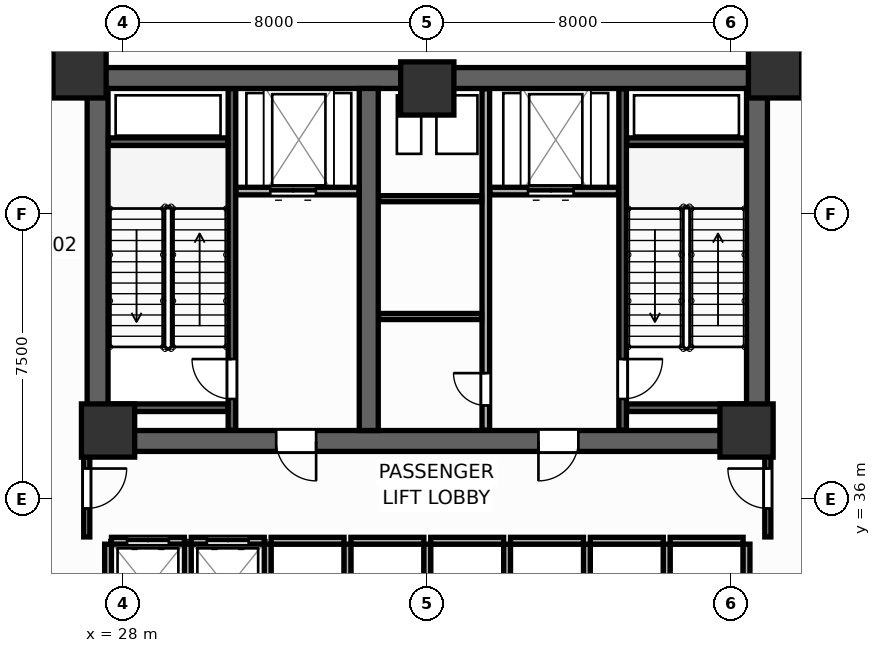
"""IFC4 building model, lengths in metres.
Left out: names, types, materials, properties, quantities, classifications, styles, units other than length and angle.
Written with IfcOpenShell. Run it as: python <this file> out.ifc"""

import sys

from ifc_helpers import new_model, si_unit, direction, frame, frame_2d, origin, origin_2d, place, context, subcontext, project, spatial, rectangle, extrude, source, transform, mapped, element, fill, save


model = new_model("IFC4")
c1 = context("Model", 3, precision=1e-05, world=origin(), true_north=direction((0.0, 1.0)))
c2 = subcontext(c1, "Body", "Model", "MODEL_VIEW")
j1 = project(units=[si_unit("LENGTHUNIT", "METRE"), si_unit("PLANEANGLEUNIT", "RADIAN")], contexts=[c1])
p1 = place(None, origin())
s1 = spatial("IfcSite", under=j1, at=p1, CompositionType="ELEMENT")
p2 = place(p1, origin())
s2 = spatial("IfcBuilding", under=s1, at=p2, CompositionType="ELEMENT")
p3 = place(p2, frame((0.0, 0.0, 59.1)))
s3 = spatial("IfcBuildingStorey", under=s2, at=p3, CompositionType="ELEMENT", Elevation=59.1)
p4 = place(p3, frame((27.05, 47.075, 0.0), z_axis=(0.0, 0.0, 1.0), x_axis=(1.0, 0.0, 0.0)))
e1 = element("IfcWall", 1, at=p4, inside=s3, PredefinedType="SHEAR", context=c2, shape_type="SweptSolid", body=[
    extrude(rectangle(XDim=17.9, YDim=0.55, at=frame_2d((8.95, 0.0))), origin(), (0.0, 0.0, 1.0), 4.8),
])
p5 = place(p3, frame((27.05, 37.525, 0.0), z_axis=(0.0, 0.0, 1.0), x_axis=(1.0, 0.0, 0.0)))
e2 = element("IfcWall", 2, at=p5, inside=s3, PredefinedType="SHEAR", context=c2, shape_type="SweptSolid", body=[
    extrude(rectangle(XDim=17.9, YDim=0.55, at=frame_2d((8.95, 0.0))), origin(), (0.0, 0.0, 1.0), 4.8),
])
p6 = place(p5, frame((4.975, 0.0, 0.0)))
e3 = element("IfcOpeningElement", 3, at=p6, cuts=e2, PredefinedType="OPENING", context=c2, shape_type="SweptSolid", body=[
    extrude(rectangle(XDim=1.05, YDim=2.1, at=frame_2d((0.525, 1.05))), frame((0.0, 0.285, 0.0), z_axis=(0.0, -1.0, 0.0), x_axis=(1.0, 0.0, 0.0)), (0.0, 0.0, 1.0), 0.57),
])
p7 = place(p5, frame((11.875, 0.0, 0.0)))
e4 = element("IfcOpeningElement", 4, at=p7, cuts=e2, PredefinedType="OPENING", context=c2, shape_type="SweptSolid", body=[
    extrude(rectangle(XDim=1.05, YDim=2.1, at=frame_2d((0.525, 1.05))), frame((0.0, 0.285, 0.0), z_axis=(0.0, -1.0, 0.0), x_axis=(1.0, 0.0, 0.0)), (0.0, 0.0, 1.0), 0.57),
])
for number, where, z_axis, x_axis in (
    (5, (27.325, 37.8, 0.0), (0.0, 0.0, 1.0), (0.0, 1.0, 0.0)),
    (6, (44.675, 37.8, 0.0), (0.0, 0.0, 1.0), (0.0, 1.0, 0.0)),
):
    element("IfcWall", number, at=place(p3, frame(where, z_axis=z_axis, x_axis=x_axis)), inside=s3, PredefinedType="SHEAR", context=c2, shape_type="SweptSolid", body=[
        extrude(rectangle(XDim=9.0, YDim=0.55, at=frame_2d((4.5, 0.0))), origin(), (0.0, 0.0, 1.0), 4.8),
    ])
p8 = place(p3, frame((34.46, 37.8, 0.0), z_axis=(0.0, 0.0, 1.0), x_axis=(0.0, 1.0, 0.0)))
e7 = element("IfcWall", 7, at=p8, inside=s3, PredefinedType="SHEAR", context=c2, shape_type="SweptSolid", body=[
    extrude(rectangle(XDim=9.0, YDim=0.5, at=frame_2d((4.5, 0.0))), origin(), (0.0, 0.0, 1.0), 4.58),
])
m1 = source(origin(), c2, "Body", "SweptSolid", [
    extrude(rectangle(XDim=1.4, YDim=1.4, at=origin_2d()), origin(), (0.0, 0.0, 1.0), 4.8),
])
for number, where, z_axis, x_axis in (
    (8, (26.85, 47.25, 0.0), (0.0, 0.0, 1.0), (1.0, 0.0, 0.0)),
    (9, (45.15, 47.25, 0.0), (0.0, 0.0, 1.0), (1.0, 0.0, 0.0)),
    (10, (27.6, 37.8, 0.0), (0.0, 0.0, 1.0), (1.0, 0.0, 0.0)),
    (11, (44.4, 37.8, 0.0), (0.0, 0.0, 1.0), (1.0, 0.0, 0.0)),
    (12, (36.0, 46.8, 0.0), (0.0, 0.0, 1.0), (1.0, 0.0, 0.0)),
):
    element("IfcColumn", number, at=place(p3, frame(where, z_axis=z_axis, x_axis=x_axis)), inside=s3, PredefinedType="COLUMN", context=c2, shape_type="MappedRepresentation", body=[
        mapped(m1, transform((0.0, 0.0, 0.0), scale=1.0)),
    ])
p9 = place(p3, frame((30.86, 37.81, 0.0), z_axis=(0.0, 0.0, 1.0), x_axis=(0.0, 1.0, 0.0)))
e13 = element("IfcWall", 13, at=p9, inside=s3, PredefinedType="SHEAR", context=c2, shape_type="SweptSolid", body=[
    extrude(rectangle(XDim=8.98, YDim=0.2, at=frame_2d((4.49, 0.0))), origin(), (0.0, 0.0, 1.0), 4.8),
])
p10 = place(p9, frame((0.82, 0.0, 0.0)))
e14 = element("IfcOpeningElement", 14, at=p10, cuts=e13, PredefinedType="OPENING", context=c2, shape_type="SweptSolid", body=[
    extrude(rectangle(XDim=1.05, YDim=2.1, at=frame_2d((0.525, 1.05))), frame((0.0, 0.11, 0.0), z_axis=(0.0, -1.0, 0.0), x_axis=(1.0, 0.0, 0.0)), (0.0, 0.0, 1.0), 0.22),
])
for number, where, z_axis, x_axis in (
    (15, (27.61, 45.4, 0.0), (0.0, 0.0, 1.0), (1.0, 0.0, 0.0)),
    (16, (27.61, 38.4, 0.0), (0.0, 0.0, 1.0), (1.0, 0.0, 0.0)),
):
    element("IfcWall", number, at=place(p3, frame(where, z_axis=z_axis, x_axis=x_axis)), inside=s3, PredefinedType="SHEAR", context=c2, shape_type="SweptSolid", body=[
        extrude(rectangle(XDim=3.14, YDim=0.2, at=frame_2d((1.57, 0.0))), origin(), (0.0, 0.0, 1.0), 4.8),
    ])
p11 = place(p3, frame((41.14, 37.81, 0.0), z_axis=(0.0, 0.0, 1.0), x_axis=(0.0, 1.0, 0.0)))
e17 = element("IfcWall", 17, at=p11, inside=s3, PredefinedType="SHEAR", context=c2, shape_type="SweptSolid", body=[
    extrude(rectangle(XDim=8.98, YDim=0.2, at=frame_2d((4.49, 0.0))), origin(), (0.0, 0.0, 1.0), 4.8),
])
p12 = place(p11, frame((0.82, 0.0, 0.0)))
e18 = element("IfcOpeningElement", 18, at=p12, cuts=e17, PredefinedType="OPENING", context=c2, shape_type="SweptSolid", body=[
    extrude(rectangle(XDim=1.05, YDim=2.1, at=frame_2d((0.525, 1.05))), frame((0.0, 0.11, 0.0), z_axis=(0.0, -1.0, 0.0), x_axis=(1.0, 0.0, 0.0)), (0.0, 0.0, 1.0), 0.22),
])
for number, where, z_axis, x_axis in (
    (19, (41.25, 45.4, 0.0), (0.0, 0.0, 1.0), (1.0, 0.0, 0.0)),
    (20, (41.25, 38.4, 0.0), (0.0, 0.0, 1.0), (1.0, 0.0, 0.0)),
):
    element("IfcWall", number, at=place(p3, frame(where, z_axis=z_axis, x_axis=x_axis)), inside=s3, PredefinedType="SHEAR", context=c2, shape_type="SweptSolid", body=[
        extrude(rectangle(XDim=3.14, YDim=0.2, at=frame_2d((1.57, 0.0))), origin(), (0.0, 0.0, 1.0), 4.8),
    ])
p13 = place(p3, frame((30.97, 44.1, 0.0), z_axis=(0.0, 0.0, 1.0), x_axis=(1.0, 0.0, 0.0)))
e21 = element("IfcWall", 21, at=p13, inside=s3, PredefinedType="PARTITIONING", context=c2, shape_type="SweptSolid", body=[
    extrude(rectangle(XDim=3.23, YDim=0.2, at=frame_2d((1.615, 0.0))), origin(), (0.0, 0.0, 1.0), 4.58),
])
p14 = place(p13, frame((0.9, 0.0, 0.0)))
e22 = element("IfcOpeningElement", 22, at=p14, cuts=e21, PredefinedType="OPENING", context=c2, shape_type="SweptSolid", body=[
    extrude(rectangle(XDim=1.2, YDim=2.1, at=frame_2d((0.6, 1.05))), frame((0.0, 0.11, 0.0), z_axis=(0.0, -1.0, 0.0), x_axis=(1.0, 0.0, 0.0)), (0.0, 0.0, 1.0), 0.22),
])
p15 = place(p3, frame((37.65, 44.1, 0.0), z_axis=(0.0, 0.0, 1.0), x_axis=(1.0, 0.0, 0.0)))
e23 = element("IfcWall", 23, at=p15, inside=s3, PredefinedType="PARTITIONING", context=c2, shape_type="SweptSolid", body=[
    extrude(rectangle(XDim=3.38, YDim=0.2, at=frame_2d((1.69, 0.0))), origin(), (0.0, 0.0, 1.0), 4.58),
])
p16 = place(p15, frame((1.0, 0.0, 0.0)))
e24 = element("IfcOpeningElement", 24, at=p16, cuts=e23, PredefinedType="OPENING", context=c2, shape_type="SweptSolid", body=[
    extrude(rectangle(XDim=1.2, YDim=2.1, at=frame_2d((0.6, 1.05))), frame((0.0, 0.11, 0.0), z_axis=(0.0, -1.0, 0.0), x_axis=(1.0, 0.0, 0.0)), (0.0, 0.0, 1.0), 0.22),
])
p17 = place(p3, frame((37.54, 37.81, 0.0), z_axis=(0.0, 0.0, 1.0), x_axis=(0.0, 1.0, 0.0)))
e25 = element("IfcWall", 25, at=p17, inside=s3, PredefinedType="PARTITIONING", context=c2, shape_type="SweptSolid", body=[
    extrude(rectangle(XDim=8.98, YDim=0.2, at=frame_2d((4.49, 0.0))), origin(), (0.0, 0.0, 1.0), 4.58),
])
p18 = place(p17, frame((0.65, 0.0, 0.0)))
e26 = element("IfcOpeningElement", 26, at=p18, cuts=e25, PredefinedType="OPENING", context=c2, shape_type="SweptSolid", body=[
    extrude(rectangle(XDim=0.85, YDim=2.05, at=frame_2d((0.425, 1.025))), frame((0.0, 0.11, 0.0), z_axis=(0.0, -1.0, 0.0), x_axis=(1.0, 0.0, 0.0)), (0.0, 0.0, 1.0), 0.22),
])
for number, where, z_axis, x_axis in (
    (27, (34.72, 40.8, 0.0), (0.0, 0.0, 1.0), (1.0, 0.0, 0.0)),
    (28, (34.72, 43.9, 0.0), (0.0, 0.0, 1.0), (1.0, 0.0, 0.0)),
):
    element("IfcWall", number, at=place(p3, frame(where, z_axis=z_axis, x_axis=x_axis)), inside=s3, PredefinedType="PARTITIONING", context=c2, shape_type="SweptSolid", body=[
        extrude(rectangle(XDim=2.71, YDim=0.16, at=frame_2d((1.355, 0.0))), origin(), (0.0, 0.0, 1.0), 4.58),
    ])
p19 = place(p3, frame((27.69, 34.9, 0.0), z_axis=(0.0, 0.0, 1.0), x_axis=(1.0, 0.0, 0.0)))
e29 = element("IfcWall", 29, at=p19, inside=s3, PredefinedType="PARTITIONING", context=c2, shape_type="SweptSolid", body=[
    extrude(rectangle(XDim=1.92, YDim=0.18, at=frame_2d((0.96, 0.0))), origin(), (0.0, 0.0, 1.0), 4.58),
])
p20 = place(p19, frame((0.41, 0.0, 0.0)))
e30 = element("IfcOpeningElement", 30, at=p20, cuts=e29, PredefinedType="OPENING", context=c2, shape_type="SweptSolid", body=[
    extrude(rectangle(XDim=1.1, YDim=2.1, at=frame_2d((0.55, 1.05))), frame((0.0, 0.1, 0.0), z_axis=(0.0, -1.0, 0.0), x_axis=(1.0, 0.0, 0.0)), (0.0, 0.0, 1.0), 0.2),
])
p21 = place(p3, frame((27.6, 32.49, 0.0), z_axis=(0.0, 0.0, 1.0), x_axis=(0.0, 1.0, 0.0)))
e31 = element("IfcWall", 31, at=p21, inside=s3, PredefinedType="PARTITIONING", context=c2, shape_type="SweptSolid", body=[
    extrude(rectangle(XDim=2.32, YDim=0.18, at=frame_2d((1.16, 0.0))), origin(), (0.0, 0.0, 1.0), 4.58),
])
p22 = place(p3, frame((29.79, 34.9, 0.0), z_axis=(0.0, 0.0, 1.0), x_axis=(1.0, 0.0, 0.0)))
e32 = element("IfcWall", 32, at=p22, inside=s3, PredefinedType="PARTITIONING", context=c2, shape_type="SweptSolid", body=[
    extrude(rectangle(XDim=1.92, YDim=0.18, at=frame_2d((0.96, 0.0))), origin(), (0.0, 0.0, 1.0), 4.58),
])
p23 = place(p22, frame((0.41, 0.0, 0.0)))
e33 = element("IfcOpeningElement", 33, at=p23, cuts=e32, PredefinedType="OPENING", context=c2, shape_type="SweptSolid", body=[
    extrude(rectangle(XDim=1.1, YDim=2.1, at=frame_2d((0.55, 1.05))), frame((0.0, 0.1, 0.0), z_axis=(0.0, -1.0, 0.0), x_axis=(1.0, 0.0, 0.0)), (0.0, 0.0, 1.0), 0.2),
])
p24 = place(p3, frame((29.7, 32.49, 0.0), z_axis=(0.0, 0.0, 1.0), x_axis=(0.0, 1.0, 0.0)))
e34 = element("IfcWall", 34, at=p24, inside=s3, PredefinedType="PARTITIONING", context=c2, shape_type="SweptSolid", body=[
    extrude(rectangle(XDim=2.32, YDim=0.18, at=frame_2d((1.16, 0.0))), origin(), (0.0, 0.0, 1.0), 4.58),
])
p25 = place(p3, frame((31.89, 34.9, 0.0), z_axis=(0.0, 0.0, 1.0), x_axis=(1.0, 0.0, 0.0)))
e35 = element("IfcWall", 35, at=p25, inside=s3, PredefinedType="PARTITIONING", context=c2, shape_type="SweptSolid", body=[
    extrude(rectangle(XDim=1.92, YDim=0.18, at=frame_2d((0.96, 0.0))), origin(), (0.0, 0.0, 1.0), 4.58),
])
p26 = place(p3, frame((31.8, 32.49, 0.0), z_axis=(0.0, 0.0, 1.0), x_axis=(0.0, 1.0, 0.0)))
e36 = element("IfcWall", 36, at=p26, inside=s3, PredefinedType="PARTITIONING", context=c2, shape_type="SweptSolid", body=[
    extrude(rectangle(XDim=2.32, YDim=0.18, at=frame_2d((1.16, 0.0))), origin(), (0.0, 0.0, 1.0), 4.58),
])
p27 = place(p3, frame((33.99, 34.9, 0.0), z_axis=(0.0, 0.0, 1.0), x_axis=(1.0, 0.0, 0.0)))
e37 = element("IfcWall", 37, at=p27, inside=s3, PredefinedType="PARTITIONING", context=c2, shape_type="SweptSolid", body=[
    extrude(rectangle(XDim=1.92, YDim=0.18, at=frame_2d((0.96, 0.0))), origin(), (0.0, 0.0, 1.0), 4.58),
])
p28 = place(p3, frame((33.9, 32.49, 0.0), z_axis=(0.0, 0.0, 1.0), x_axis=(0.0, 1.0, 0.0)))
e38 = element("IfcWall", 38, at=p28, inside=s3, PredefinedType="PARTITIONING", context=c2, shape_type="SweptSolid", body=[
    extrude(rectangle(XDim=2.32, YDim=0.18, at=frame_2d((1.16, 0.0))), origin(), (0.0, 0.0, 1.0), 4.58),
])
p29 = place(p3, frame((36.09, 34.9, 0.0), z_axis=(0.0, 0.0, 1.0), x_axis=(1.0, 0.0, 0.0)))
e39 = element("IfcWall", 39, at=p29, inside=s3, PredefinedType="PARTITIONING", context=c2, shape_type="SweptSolid", body=[
    extrude(rectangle(XDim=1.92, YDim=0.18, at=frame_2d((0.96, 0.0))), origin(), (0.0, 0.0, 1.0), 4.58),
])
p30 = place(p3, frame((36.0, 32.49, 0.0), z_axis=(0.0, 0.0, 1.0), x_axis=(0.0, 1.0, 0.0)))
e40 = element("IfcWall", 40, at=p30, inside=s3, PredefinedType="PARTITIONING", context=c2, shape_type="SweptSolid", body=[
    extrude(rectangle(XDim=2.32, YDim=0.18, at=frame_2d((1.16, 0.0))), origin(), (0.0, 0.0, 1.0), 4.58),
])
p31 = place(p3, frame((38.19, 34.9, 0.0), z_axis=(0.0, 0.0, 1.0), x_axis=(1.0, 0.0, 0.0)))
e41 = element("IfcWall", 41, at=p31, inside=s3, PredefinedType="PARTITIONING", context=c2, shape_type="SweptSolid", body=[
    extrude(rectangle(XDim=1.92, YDim=0.18, at=frame_2d((0.96, 0.0))), origin(), (0.0, 0.0, 1.0), 4.58),
])
p32 = place(p3, frame((38.1, 32.49, 0.0), z_axis=(0.0, 0.0, 1.0), x_axis=(0.0, 1.0, 0.0)))
e42 = element("IfcWall", 42, at=p32, inside=s3, PredefinedType="PARTITIONING", context=c2, shape_type="SweptSolid", body=[
    extrude(rectangle(XDim=2.32, YDim=0.18, at=frame_2d((1.16, 0.0))), origin(), (0.0, 0.0, 1.0), 4.58),
])
p33 = place(p3, frame((40.29, 34.9, 0.0), z_axis=(0.0, 0.0, 1.0), x_axis=(1.0, 0.0, 0.0)))
e43 = element("IfcWall", 43, at=p33, inside=s3, PredefinedType="PARTITIONING", context=c2, shape_type="SweptSolid", body=[
    extrude(rectangle(XDim=1.92, YDim=0.18, at=frame_2d((0.96, 0.0))), origin(), (0.0, 0.0, 1.0), 4.58),
])
p34 = place(p3, frame((40.2, 32.49, 0.0), z_axis=(0.0, 0.0, 1.0), x_axis=(0.0, 1.0, 0.0)))
e44 = element("IfcWall", 44, at=p34, inside=s3, PredefinedType="PARTITIONING", context=c2, shape_type="SweptSolid", body=[
    extrude(rectangle(XDim=2.32, YDim=0.18, at=frame_2d((1.16, 0.0))), origin(), (0.0, 0.0, 1.0), 4.58),
])
p35 = place(p3, frame((42.39, 34.9, 0.0), z_axis=(0.0, 0.0, 1.0), x_axis=(1.0, 0.0, 0.0)))
e45 = element("IfcWall", 45, at=p35, inside=s3, PredefinedType="PARTITIONING", context=c2, shape_type="SweptSolid", body=[
    extrude(rectangle(XDim=1.92, YDim=0.18, at=frame_2d((0.96, 0.0))), origin(), (0.0, 0.0, 1.0), 4.58),
])
for number, where, z_axis, x_axis in (
    (46, (42.3, 32.49, 0.0), (0.0, 0.0, 1.0), (0.0, 1.0, 0.0)),
    (47, (44.4, 32.49, 0.0), (0.0, 0.0, 1.0), (0.0, 1.0, 0.0)),
):
    element("IfcWall", number, at=place(p3, frame(where, z_axis=z_axis, x_axis=x_axis)), inside=s3, PredefinedType="PARTITIONING", context=c2, shape_type="SweptSolid", body=[
        extrude(rectangle(XDim=2.32, YDim=0.18, at=frame_2d((1.16, 0.0))), origin(), (0.0, 0.0, 1.0), 4.58),
    ])
p36 = place(p3, frame((27.04, 35.0, 0.0), z_axis=(0.0, 0.0, 1.0), x_axis=(0.0, 1.0, 0.0)))
e48 = element("IfcWall", 48, at=p36, inside=s3, PredefinedType="PARTITIONING", context=c2, shape_type="SweptSolid", body=[
    extrude(rectangle(XDim=2.65, YDim=0.16, at=frame_2d((1.325, 0.0))), origin(), (0.0, 0.0, 1.0), 4.58),
])
p37 = place(p36, frame((0.75, 0.0, 0.0)))
e49 = element("IfcOpeningElement", 49, at=p37, cuts=e48, PredefinedType="OPENING", context=c2, shape_type="SweptSolid", body=[
    extrude(rectangle(XDim=1.05, YDim=2.1, at=frame_2d((0.525, 1.05))), frame((0.0, 0.09, 0.0), z_axis=(0.0, -1.0, 0.0), x_axis=(1.0, 0.0, 0.0)), (0.0, 0.0, 1.0), 0.18),
])
p38 = place(p3, frame((44.96, 35.0, 0.0), z_axis=(0.0, 0.0, 1.0), x_axis=(0.0, 1.0, 0.0)))
e50 = element("IfcWall", 50, at=p38, inside=s3, PredefinedType="PARTITIONING", context=c2, shape_type="SweptSolid", body=[
    extrude(rectangle(XDim=2.65, YDim=0.16, at=frame_2d((1.325, 0.0))), origin(), (0.0, 0.0, 1.0), 4.58),
])
p39 = place(p38, frame((0.75, 0.0, 0.0)))
e51 = element("IfcOpeningElement", 51, at=p39, cuts=e50, PredefinedType="OPENING", context=c2, shape_type="SweptSolid", body=[
    extrude(rectangle(XDim=1.05, YDim=2.1, at=frame_2d((0.525, 1.05))), frame((0.0, 0.09, 0.0), z_axis=(0.0, -1.0, 0.0), x_axis=(1.0, 0.0, 0.0)), (0.0, 0.0, 1.0), 0.18),
])
p40 = place(p10, origin())
e52 = element("IfcDoor", 52, at=p40, inside=s3, OperationType="SINGLE_SWING_RIGHT", PredefinedType="DOOR", context=c2, shape_type="SweptSolid", body=[
    extrude(rectangle(XDim=1.05, YDim=2.1, at=frame_2d((0.525, 1.05))), frame((0.0, 0.025, 0.0), z_axis=(0.0, -1.0, 0.0), x_axis=(1.0, 0.0, 0.0)), (0.0, 0.0, 1.0), 0.05),
])
fill(e14, e52)
p41 = place(p12, frame((1.05, 0.0, 0.0), z_axis=(0.0, 0.0, 1.0), x_axis=(-1.0, 0.0, 0.0)))
e53 = element("IfcDoor", 53, at=p41, inside=s3, OperationType="SINGLE_SWING_LEFT", PredefinedType="DOOR", context=c2, shape_type="SweptSolid", body=[
    extrude(rectangle(XDim=1.05, YDim=2.1, at=frame_2d((0.525, 1.05))), frame((0.0, 0.025, 0.0), z_axis=(0.0, -1.0, 0.0), x_axis=(1.0, 0.0, 0.0)), (0.0, 0.0, 1.0), 0.05),
])
fill(e18, e53)
p42 = place(p14, origin())
e54 = element("IfcDoor", 54, at=p42, inside=s3, OperationType="DOUBLE_DOOR_SLIDING", PredefinedType="DOOR", context=c2, shape_type="SweptSolid", body=[
    extrude(rectangle(XDim=1.2, YDim=2.1, at=frame_2d((0.6, 1.05))), frame((0.0, 0.025, 0.0), z_axis=(0.0, -1.0, 0.0), x_axis=(1.0, 0.0, 0.0)), (0.0, 0.0, 1.0), 0.05),
])
fill(e22, e54)
p43 = place(p16, origin())
e55 = element("IfcDoor", 55, at=p43, inside=s3, OperationType="DOUBLE_DOOR_SLIDING", PredefinedType="DOOR", context=c2, shape_type="SweptSolid", body=[
    extrude(rectangle(XDim=1.2, YDim=2.1, at=frame_2d((0.6, 1.05))), frame((0.0, 0.025, 0.0), z_axis=(0.0, -1.0, 0.0), x_axis=(1.0, 0.0, 0.0)), (0.0, 0.0, 1.0), 0.05),
])
fill(e24, e55)
p44 = place(p18, origin())
e56 = element("IfcDoor", 56, at=p44, inside=s3, OperationType="SINGLE_SWING_RIGHT", PredefinedType="DOOR", context=c2, shape_type="SweptSolid", body=[
    extrude(rectangle(XDim=0.85, YDim=2.05, at=frame_2d((0.425, 1.025))), frame((0.0, 0.025, 0.0), z_axis=(0.0, -1.0, 0.0), x_axis=(1.0, 0.0, 0.0)), (0.0, 0.0, 1.0), 0.05),
])
fill(e26, e56)
p45 = place(p20, origin())
e57 = element("IfcDoor", 57, at=p45, inside=s3, OperationType="DOUBLE_DOOR_SLIDING", PredefinedType="DOOR", context=c2, shape_type="SweptSolid", body=[
    extrude(rectangle(XDim=1.1, YDim=2.1, at=frame_2d((0.55, 1.05))), frame((0.0, 0.025, 0.0), z_axis=(0.0, -1.0, 0.0), x_axis=(1.0, 0.0, 0.0)), (0.0, 0.0, 1.0), 0.05),
])
fill(e30, e57)
p46 = place(p23, origin())
e58 = element("IfcDoor", 58, at=p46, inside=s3, OperationType="DOUBLE_DOOR_SLIDING", PredefinedType="DOOR", context=c2, shape_type="SweptSolid", body=[
    extrude(rectangle(XDim=1.1, YDim=2.1, at=frame_2d((0.55, 1.05))), frame((0.0, 0.025, 0.0), z_axis=(0.0, -1.0, 0.0), x_axis=(1.0, 0.0, 0.0)), (0.0, 0.0, 1.0), 0.05),
])
fill(e33, e58)
p47 = place(p37, frame((1.05, 0.0, 0.0), z_axis=(0.0, 0.0, 1.0), x_axis=(-1.0, 0.0, 0.0)))
e59 = element("IfcDoor", 59, at=p47, inside=s3, OperationType="SINGLE_SWING_LEFT", PredefinedType="DOOR", context=c2, shape_type="SweptSolid", body=[
    extrude(rectangle(XDim=1.05, YDim=2.1, at=frame_2d((0.525, 1.05))), frame((0.0, 0.025, 0.0), z_axis=(0.0, -1.0, 0.0), x_axis=(1.0, 0.0, 0.0)), (0.0, 0.0, 1.0), 0.05),
])
fill(e49, e59)
p48 = place(p39, origin())
e60 = element("IfcDoor", 60, at=p48, inside=s3, OperationType="SINGLE_SWING_RIGHT", PredefinedType="DOOR", context=c2, shape_type="SweptSolid", body=[
    extrude(rectangle(XDim=1.05, YDim=2.1, at=frame_2d((0.525, 1.05))), frame((0.0, 0.025, 0.0), z_axis=(0.0, -1.0, 0.0), x_axis=(1.0, 0.0, 0.0)), (0.0, 0.0, 1.0), 0.05),
])
fill(e51, e60)
p49 = place(p6, frame((1.05, 0.0, 0.0), z_axis=(0.0, 0.0, 1.0), x_axis=(-1.0, 0.0, 0.0)))
e61 = element("IfcDoor", 61, at=p49, inside=s3, OperationType="SINGLE_SWING_LEFT", PredefinedType="DOOR", context=c2, shape_type="SweptSolid", body=[
    extrude(rectangle(XDim=1.05, YDim=2.1, at=frame_2d((0.525, 1.05))), frame((0.0, 0.025, 0.0), z_axis=(0.0, -1.0, 0.0), x_axis=(1.0, 0.0, 0.0)), (0.0, 0.0, 1.0), 0.05),
])
fill(e3, e61)
p50 = place(p7, frame((1.05, 0.0, 0.0), z_axis=(0.0, 0.0, 1.0), x_axis=(-1.0, 0.0, 0.0)))
e62 = element("IfcDoor", 62, at=p50, inside=s3, OperationType="SINGLE_SWING_RIGHT", PredefinedType="DOOR", context=c2, shape_type="SweptSolid", body=[
    extrude(rectangle(XDim=1.05, YDim=2.1, at=frame_2d((0.525, 1.05))), frame((0.0, 0.025, 0.0), z_axis=(0.0, -1.0, 0.0), x_axis=(1.0, 0.0, 0.0)), (0.0, 0.0, 1.0), 0.05),
])
fill(e4, e62)
save(model, sys.argv[1])
